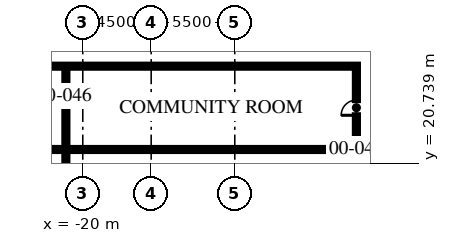
"""IFC4 building model, lengths in metres.
Left out: names, types, materials, properties, quantities, classifications, styles, units other than length and angle.
Written with IfcOpenShell. Run it as: python <this file> out.ifc"""

import sys

from ifc_helpers import new_model, si_unit, direction, frame, frame_2d, origin, place, context, subcontext, project, spatial, rectangle, extrude, element, fill, save


model = new_model("IFC4")
c1 = context("Model", 3, precision=1e-05, world=origin(), true_north=direction((0.0, 1.0)))
c2 = subcontext(c1, "Body", "Model", "MODEL_VIEW")
j1 = project(units=[si_unit("LENGTHUNIT", "METRE"), si_unit("PLANEANGLEUNIT", "RADIAN")], contexts=[c1])
p1 = place(None, origin())
s1 = spatial("IfcSite", under=j1, at=p1, CompositionType="ELEMENT")
p2 = place(p1, origin())
s2 = spatial("IfcBuilding", under=s1, at=p2, CompositionType="ELEMENT")
p3 = place(p2, origin())
s3 = spatial("IfcBuildingStorey", under=s2, at=p3, CompositionType="ELEMENT", Elevation=0.0)
p4 = place(p3, frame((-21.111, -20.491, 0.0), z_axis=(0.0, 0.0, 1.0), x_axis=(0.0, 1.0, 0.0)))
e1 = element("IfcWall", 1, at=p4, inside=s3, PredefinedType="SOLIDWALL", context=c2, shape_type="SweptSolid", body=[
    extrude(rectangle(XDim=42.022, YDim=0.2, at=frame_2d((21.011, 0.0))), origin(), (0.0, 0.0, 1.0), 4.5),
])
p5 = place(p4, frame((6.352, 0.0, 0.0)))
e2 = element("IfcOpeningElement", 2, at=p5, cuts=e1, PredefinedType="OPENING", context=c2, shape_type="SweptSolid", body=[
    extrude(rectangle(XDim=1.0, YDim=2.1, at=frame_2d((0.5, 1.05))), frame((0.0, 0.11, 0.0), z_axis=(0.0, -1.0, 0.0), x_axis=(1.0, 0.0, 0.0)), (0.0, 0.0, 1.0), 0.22),
])
p6 = place(p4, frame((17.537, 0.0, 0.0)))
e3 = element("IfcOpeningElement", 3, at=p6, cuts=e1, PredefinedType="OPENING", context=c2, shape_type="SweptSolid", body=[
    extrude(rectangle(XDim=1.0, YDim=2.1, at=frame_2d((0.5, 1.05))), frame((0.0, 0.11, 0.0), z_axis=(0.0, -1.0, 0.0), x_axis=(1.0, 0.0, 0.0)), (0.0, 0.0, 1.0), 0.22),
])
p7 = place(p4, frame((25.981, 0.0, 0.0)))
e4 = element("IfcOpeningElement", 4, at=p7, cuts=e1, PredefinedType="OPENING", context=c2, shape_type="SweptSolid", body=[
    extrude(rectangle(XDim=1.0, YDim=2.1, at=frame_2d((0.5, 1.05))), frame((0.0, 0.11, 0.0), z_axis=(0.0, -1.0, 0.0), x_axis=(1.0, 0.0, 0.0)), (0.0, 0.0, 1.0), 0.22),
])
p8 = place(p4, frame((35.907, 0.0, 0.0)))
e5 = element("IfcOpeningElement", 5, at=p8, cuts=e1, PredefinedType="OPENING", context=c2, shape_type="SweptSolid", body=[
    extrude(rectangle(XDim=1.0, YDim=2.1, at=frame_2d((0.5, 1.05))), frame((0.0, 0.11, 0.0), z_axis=(0.0, -1.0, 0.0), x_axis=(1.0, 0.0, 0.0)), (0.0, 0.0, 1.0), 0.22),
])
p9 = place(p3, frame((-28.85, 21.631, 0.0), z_axis=(0.0, 0.0, 1.0), x_axis=(1.0, 0.0, 0.0)))
e6 = element("IfcWall", 6, at=p9, inside=s3, PredefinedType="SOLIDWALL", context=c2, shape_type="SweptSolid", body=[
    extrude(rectangle(XDim=26.95, YDim=0.2, at=frame_2d((13.475, 0.0))), origin(), (0.0, 0.0, 1.0), 4.5),
])
p10 = place(p3, frame((-21.111, 21.731, 0.0), z_axis=(0.0, 0.0, 1.0), x_axis=(0.0, 1.0, 0.0)))
e7 = element("IfcWall", 7, at=p10, inside=s3, PredefinedType="SOLIDWALL", context=c2, shape_type="SweptSolid", body=[
    extrude(rectangle(XDim=5.28, YDim=0.2, at=frame_2d((2.64, 0.0))), origin(), (0.0, 0.0, 1.0), 5.7),
])
p11 = place(p3, frame((-2.0, 21.731, 0.0), z_axis=(0.0, 0.0, 1.0), x_axis=(0.0, 1.0, 0.0)))
e8 = element("IfcWall", 8, at=p11, inside=s3, PredefinedType="SOLIDWALL", context=c2, shape_type="SweptSolid", body=[
    extrude(rectangle(XDim=5.28, YDim=0.2, at=frame_2d((2.64, 0.0))), origin(), (0.0, 0.0, 1.0), 5.7),
])
p12 = place(p11, frame((2.15, 0.0, 0.0)))
e9 = element("IfcOpeningElement", 9, at=p12, cuts=e8, PredefinedType="OPENING", context=c2, shape_type="SweptSolid", body=[
    extrude(rectangle(XDim=1.0, YDim=2.1, at=frame_2d((0.5, 1.05))), frame((0.0, 0.11, 0.0), z_axis=(0.0, -1.0, 0.0), x_axis=(1.0, 0.0, 0.0)), (0.0, 0.0, 1.0), 0.22),
])
p13 = place(p3, frame((-38.075, 27.111, 0.0), z_axis=(0.0, 0.0, 1.0), x_axis=(1.0, 0.0, 0.0)))
e10 = element("IfcWall", 10, at=p13, inside=s3, PredefinedType="SOLIDWALL", context=c2, shape_type="SweptSolid", body=[
    extrude(rectangle(XDim=36.175, YDim=0.2, at=frame_2d((18.087, 0.0))), origin(), (0.0, 0.0, 1.0), 4.5),
])
p14 = place(p13, frame((3.115, 0.0, 0.0)))
e11 = element("IfcOpeningElement", 11, at=p14, cuts=e10, PredefinedType="OPENING", context=c2, shape_type="SweptSolid", body=[
    extrude(rectangle(XDim=0.9, YDim=2.1, at=frame_2d((0.45, 1.05))), frame((0.0, 0.11, 0.0), z_axis=(0.0, -1.0, 0.0), x_axis=(1.0, 0.0, 0.0)), (0.0, 0.0, 1.0), 0.22),
])
p15 = place(p13, frame((11.227, 0.0, 0.0)))
e12 = element("IfcOpeningElement", 12, at=p15, cuts=e10, PredefinedType="OPENING", context=c2, shape_type="SweptSolid", body=[
    extrude(rectangle(XDim=1.0, YDim=2.1, at=frame_2d((0.5, 1.05))), frame((0.0, 0.11, 0.0), z_axis=(0.0, -1.0, 0.0), x_axis=(1.0, 0.0, 0.0)), (0.0, 0.0, 1.0), 0.22),
])
p16 = place(p13, frame((14.469, 0.0, 0.0)))
e13 = element("IfcOpeningElement", 13, at=p16, cuts=e10, PredefinedType="OPENING", context=c2, shape_type="SweptSolid", body=[
    extrude(rectangle(XDim=0.9, YDim=2.1, at=frame_2d((0.45, 1.05))), frame((0.0, 0.11, 0.0), z_axis=(0.0, -1.0, 0.0), x_axis=(1.0, 0.0, 0.0)), (0.0, 0.0, 1.0), 0.22),
])
p17 = place(p12, origin())
e14 = element("IfcDoor", 14, at=p17, inside=s3, OperationType="SINGLE_SWING_LEFT", PredefinedType="DOOR", context=c2, shape_type="SweptSolid", body=[
    extrude(rectangle(XDim=1.0, YDim=2.1, at=frame_2d((0.5, 1.05))), frame((0.0, 0.025, 0.0), z_axis=(0.0, -1.0, 0.0), x_axis=(1.0, 0.0, 0.0)), (0.0, 0.0, 1.0), 0.05),
])
fill(e9, e14)
save(model, sys.argv[1])
